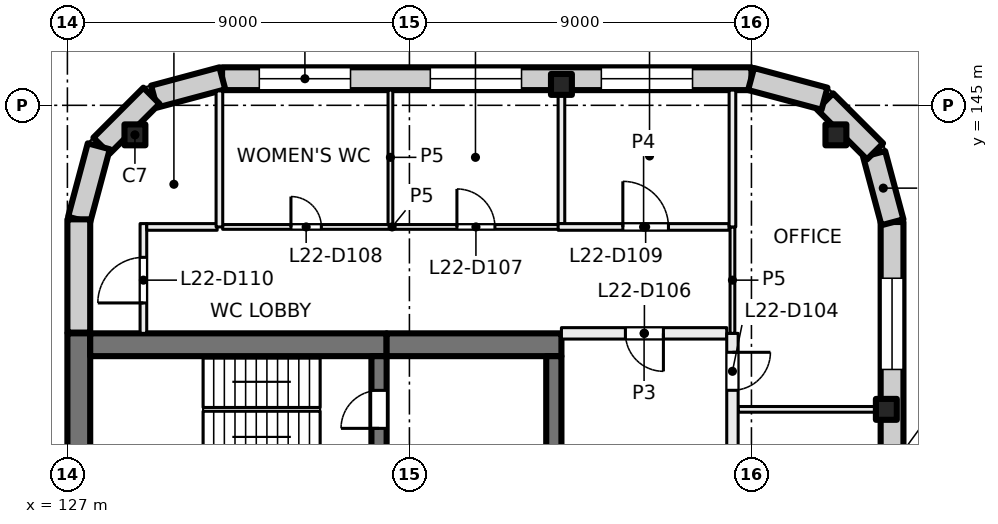
"""IFC4 building model, lengths in metres.
Left out: names, types, materials, properties, quantities, classifications, styles, units other than length and angle.
Written with IfcOpenShell. Run it as: python <this file> out.ifc"""

import sys

from ifc_helpers import new_model, si_unit, direction, frame, frame_2d, origin, origin_2d, place, context, subcontext, project, spatial, rectangle, extrude, element, fill, save


model = new_model("IFC4")
c1 = context("Model", 3, precision=1e-05, world=origin(), true_north=direction((0.0, 1.0)))
c2 = subcontext(c1, "Body", "Model", "MODEL_VIEW")
j1 = project(units=[si_unit("LENGTHUNIT", "METRE"), si_unit("PLANEANGLEUNIT", "RADIAN")], contexts=[c1])
p1 = place(None, origin())
s1 = spatial("IfcSite", under=j1, at=p1, CompositionType="ELEMENT")
p2 = place(p1, origin())
s2 = spatial("IfcBuilding", under=s1, at=p2, CompositionType="ELEMENT")
p3 = place(p2, frame((0.0, 0.0, 97.0)))
s3 = spatial("IfcBuildingStorey", under=s2, at=p3, CompositionType="ELEMENT", Elevation=97.0)
for number, where, z_axis, x_axis in (
    (1, (128.777, 144.223, 0.0), (0.0, 0.0, 1.0), (1.0, 0.0, 0.0)),
    (2, (148.55, 137.0, 0.0), (0.0, 0.0, 1.0), (1.0, 0.0, 0.0)),
    (3, (140.0, 145.55, 0.0), (0.0, 0.0, 1.0), (1.0, 0.0, 0.0)),
    (4, (147.223, 144.223, 0.0), (0.0, 0.0, 1.0), (1.0, 0.0, 0.0)),
):
    element("IfcColumn", number, at=place(p3, frame(where, z_axis=z_axis, x_axis=x_axis)), inside=s3, PredefinedType="COLUMN", context=c2, shape_type="SweptSolid", body=[
        extrude(rectangle(XDim=0.55, YDim=0.55, at=origin_2d()), origin(), (0.0, 0.0, 1.0), 4.0),
    ])
p4 = place(p3, frame((127.3, 135.2, 0.0), z_axis=(0.0, 0.0, 1.0), x_axis=(0.0, 1.0, 0.0)))
e5 = element("IfcWall", 5, at=p4, inside=s3, PredefinedType="SHEAR", context=c2, shape_type="SweptSolid", body=[
    extrude(rectangle(XDim=3.8, YDim=0.6, at=frame_2d((1.9, 0.0))), origin(), (0.0, 0.0, 1.0), 4.0),
])
p5 = place(p3, frame((127.6, 138.7, 0.0), z_axis=(0.0, 0.0, 1.0), x_axis=(1.0, 0.0, 0.0)))
e6 = element("IfcWall", 6, at=p5, inside=s3, PredefinedType="SHEAR", context=c2, shape_type="SweptSolid", body=[
    extrude(rectangle(XDim=7.8, YDim=0.6, at=frame_2d((3.9, 0.0))), origin(), (0.0, 0.0, 1.0), 4.0),
])
p6 = place(p3, frame((135.4, 138.7, 0.0), z_axis=(0.0, 0.0, 1.0), x_axis=(1.0, 0.0, 0.0)))
e7 = element("IfcWall", 7, at=p6, inside=s3, PredefinedType="SHEAR", context=c2, shape_type="SweptSolid", body=[
    extrude(rectangle(XDim=4.6, YDim=0.6, at=frame_2d((2.3, 0.0))), origin(), (0.0, 0.0, 1.0), 4.0),
])
p7 = place(p3, frame((135.2, 135.6, 0.0), z_axis=(0.0, 0.0, 1.0), x_axis=(0.0, 1.0, 0.0)))
e8 = element("IfcWall", 8, at=p7, inside=s3, PredefinedType="SHEAR", context=c2, shape_type="SweptSolid", body=[
    extrude(rectangle(XDim=2.8, YDim=0.4, at=frame_2d((1.4, 0.0))), origin(), (0.0, 0.0, 1.0), 4.0),
])
p8 = place(p7, frame((0.9, 0.0, 0.0)))
e9 = element("IfcOpeningElement", 9, at=p8, cuts=e8, PredefinedType="OPENING", context=c2, shape_type="SweptSolid", body=[
    extrude(rectangle(XDim=1.0, YDim=2.1, at=frame_2d((0.5, 1.05))), frame((0.0, 0.21, 0.0), z_axis=(0.0, -1.0, 0.0), x_axis=(1.0, 0.0, 0.0)), (0.0, 0.0, 1.0), 0.42),
])
p9 = place(p3, frame((139.8, 129.8, 0.0), z_axis=(0.0, 0.0, 1.0), x_axis=(0.0, 1.0, 0.0)))
e10 = element("IfcWall", 10, at=p9, inside=s3, PredefinedType="SHEAR", context=c2, shape_type="SweptSolid", body=[
    extrude(rectangle(XDim=8.6, YDim=0.4, at=frame_2d((4.3, 0.0))), origin(), (0.0, 0.0, 1.0), 4.0),
])
p10 = place(p3, frame((131.07, 145.7, 0.0), z_axis=(0.0, 0.0, 1.0), x_axis=(1.0, 0.0, 0.0)))
e11 = element("IfcWall", 11, at=p10, inside=s3, PredefinedType="SOLIDWALL", context=c2, shape_type="SweptSolid", body=[
    extrude(rectangle(XDim=13.93, YDim=0.6, at=frame_2d((6.965, 0.0))), origin(), (0.0, 0.0, 1.0), 3.625),
])
p11 = place(p10, frame((0.98, 0.0, 0.9)))
e12 = element("IfcOpeningElement", 12, at=p11, cuts=e11, PredefinedType="OPENING", context=c2, shape_type="SweptSolid", body=[
    extrude(rectangle(XDim=2.4, YDim=2.4, at=frame_2d((1.2, 1.2))), frame((0.0, 0.31, 0.0), z_axis=(0.0, -1.0, 0.0), x_axis=(1.0, 0.0, 0.0)), (0.0, 0.0, 1.0), 0.62),
])
p12 = place(p10, frame((5.48, 0.0, 0.9)))
e13 = element("IfcOpeningElement", 13, at=p12, cuts=e11, PredefinedType="OPENING", context=c2, shape_type="SweptSolid", body=[
    extrude(rectangle(XDim=2.4, YDim=2.4, at=frame_2d((1.2, 1.2))), frame((0.0, 0.31, 0.0), z_axis=(0.0, -1.0, 0.0), x_axis=(1.0, 0.0, 0.0)), (0.0, 0.0, 1.0), 0.62),
])
p13 = place(p10, frame((9.98, 0.0, 0.9)))
e14 = element("IfcOpeningElement", 14, at=p13, cuts=e11, PredefinedType="OPENING", context=c2, shape_type="SweptSolid", body=[
    extrude(rectangle(XDim=2.4, YDim=2.4, at=frame_2d((1.2, 1.2))), frame((0.0, 0.31, 0.0), z_axis=(0.0, -1.0, 0.0), x_axis=(1.0, 0.0, 0.0)), (0.0, 0.0, 1.0), 0.62),
])
for number, where, z_axis, x_axis in (
    (15, (129.281, 145.229, 0.0), (0.0, 0.0, 1.0), (0.966, 0.259, 0.0)),
    (16, (127.896, 143.936, 0.0), (0.0, 0.0, 1.0), (0.707, 0.707, 0.0)),
):
    element("IfcWall", number, at=place(p3, frame(where, z_axis=z_axis, x_axis=x_axis)), inside=s3, PredefinedType="SOLIDWALL", context=c2, shape_type="SweptSolid", body=[
        extrude(rectangle(XDim=1.861, YDim=0.6, at=frame_2d((0.93, 0.0))), origin(), (0.0, 0.0, 1.0), 3.625),
    ])
p14 = place(p3, frame((127.308, 141.99, 0.0), z_axis=(0.0, 0.0, 1.0), x_axis=(0.258839784042, 0.965920269068, 0.0)))
e17 = element("IfcWall", 17, at=p14, inside=s3, PredefinedType="SOLIDWALL", context=c2, shape_type="SweptSolid", body=[
    extrude(rectangle(XDim=2.0, YDim=0.6, at=frame_2d((1.0, 0.0))), origin(), (0.0, 0.0, 1.0), 3.625),
])
p15 = place(p3, frame((127.3, 139.02, 0.0), z_axis=(0.0, 0.0, 1.0), x_axis=(0.0, 1.0, 0.0)))
e18 = element("IfcWall", 18, at=p15, inside=s3, PredefinedType="SOLIDWALL", context=c2, shape_type="SweptSolid", body=[
    extrude(rectangle(XDim=2.98, YDim=0.6, at=frame_2d((1.49, 0.0))), origin(), (0.0, 0.0, 1.0), 3.625),
])
p16 = place(p3, frame((148.7, 141.93, 0.0), z_axis=(0.0, 0.0, 1.0), x_axis=(0.0, -1.0, 0.0)))
e19 = element("IfcWall", 19, at=p16, inside=s3, PredefinedType="SOLIDWALL", context=c2, shape_type="SweptSolid", body=[
    extrude(rectangle(XDim=27.93, YDim=0.6, at=frame_2d((13.965, 0.0))), origin(), (0.0, 0.0, 1.0), 3.625),
])
p17 = place(p16, frame((1.48, 0.0, 0.9)))
e20 = element("IfcOpeningElement", 20, at=p17, cuts=e19, PredefinedType="OPENING", context=c2, shape_type="SweptSolid", body=[
    extrude(rectangle(XDim=2.4, YDim=2.4, at=frame_2d((1.2, 1.2))), frame((0.0, 0.31, 0.0), z_axis=(0.0, -1.0, 0.0), x_axis=(1.0, 0.0, 0.0)), (0.0, 0.0, 1.0), 0.62),
])
p18 = place(p16, frame((5.98, 0.0, 0.9)))
e21 = element("IfcOpeningElement", 21, at=p18, cuts=e19, PredefinedType="OPENING", context=c2, shape_type="SweptSolid", body=[
    extrude(rectangle(XDim=2.4, YDim=2.4, at=frame_2d((1.2, 1.2))), frame((0.0, 0.31, 0.0), z_axis=(0.0, -1.0, 0.0), x_axis=(1.0, 0.0, 0.0)), (0.0, 0.0, 1.0), 0.62),
])
p19 = place(p16, frame((10.48, 0.0, 0.9)))
e22 = element("IfcOpeningElement", 22, at=p19, cuts=e19, PredefinedType="OPENING", context=c2, shape_type="SweptSolid", body=[
    extrude(rectangle(XDim=2.4, YDim=2.4, at=frame_2d((1.2, 1.2))), frame((0.0, 0.31, 0.0), z_axis=(0.0, -1.0, 0.0), x_axis=(1.0, 0.0, 0.0)), (0.0, 0.0, 1.0), 0.62),
])
p20 = place(p16, frame((14.98, 0.0, 0.9)))
e23 = element("IfcOpeningElement", 23, at=p20, cuts=e19, PredefinedType="OPENING", context=c2, shape_type="SweptSolid", body=[
    extrude(rectangle(XDim=2.4, YDim=2.4, at=frame_2d((1.2, 1.2))), frame((0.0, 0.31, 0.0), z_axis=(0.0, -1.0, 0.0), x_axis=(1.0, 0.0, 0.0)), (0.0, 0.0, 1.0), 0.62),
])
p21 = place(p16, frame((19.48, 0.0, 0.9)))
e24 = element("IfcOpeningElement", 24, at=p21, cuts=e19, PredefinedType="OPENING", context=c2, shape_type="SweptSolid", body=[
    extrude(rectangle(XDim=2.4, YDim=2.4, at=frame_2d((1.2, 1.2))), frame((0.0, 0.31, 0.0), z_axis=(0.0, -1.0, 0.0), x_axis=(1.0, 0.0, 0.0)), (0.0, 0.0, 1.0), 0.62),
])
p22 = place(p16, frame((23.98, 0.0, 0.9)))
e25 = element("IfcOpeningElement", 25, at=p22, cuts=e19, PredefinedType="OPENING", context=c2, shape_type="SweptSolid", body=[
    extrude(rectangle(XDim=2.4, YDim=2.4, at=frame_2d((1.2, 1.2))), frame((0.0, 0.31, 0.0), z_axis=(0.0, -1.0, 0.0), x_axis=(1.0, 0.0, 0.0)), (0.0, 0.0, 1.0), 0.62),
])
for number, where, z_axis, x_axis in (
    (26, (148.229, 143.719, 0.0), (0.0, 0.0, 1.0), (0.259, -0.966, 0.0)),
    (27, (146.936, 145.104, 0.0), (0.0, 0.0, 1.0), (0.707, -0.707, 0.0)),
):
    element("IfcWall", number, at=place(p3, frame(where, z_axis=z_axis, x_axis=x_axis)), inside=s3, PredefinedType="SOLIDWALL", context=c2, shape_type="SweptSolid", body=[
        extrude(rectangle(XDim=1.861, YDim=0.6, at=frame_2d((0.93, 0.0))), origin(), (0.0, 0.0, 1.0), 3.625),
    ])
p23 = place(p3, frame((144.99, 145.692, 0.0), z_axis=(0.0, 0.0, 1.0), x_axis=(0.965920269068, -0.258839784042, 0.0)))
e28 = element("IfcWall", 28, at=p23, inside=s3, PredefinedType="SOLIDWALL", context=c2, shape_type="SweptSolid", body=[
    extrude(rectangle(XDim=2.0, YDim=0.6, at=frame_2d((1.0, 0.0))), origin(), (0.0, 0.0, 1.0), 3.625),
])
p24 = place(p3, frame((129.0, 139.0, 0.0), z_axis=(0.0, 0.0, 1.0), x_axis=(0.0, 1.0, 0.0)))
e29 = element("IfcWall", 29, at=p24, inside=s3, PredefinedType="PARTITIONING", context=c2, shape_type="SweptSolid", body=[
    extrude(rectangle(XDim=2.888, YDim=0.175, at=frame_2d((1.444, 0.0))), origin(), (0.0, 0.0, 1.0), 3.625),
])
p25 = place(p24, frame((0.8, 0.0, 0.0)))
e30 = element("IfcOpeningElement", 30, at=p25, cuts=e29, PredefinedType="OPENING", context=c2, shape_type="SweptSolid", body=[
    extrude(rectangle(XDim=1.2, YDim=2.1, at=frame_2d((0.6, 1.05))), frame((0.0, 0.097, 0.0), z_axis=(0.0, -1.0, 0.0), x_axis=(1.0, 0.0, 0.0)), (0.0, 0.0, 1.0), 0.195),
])
p26 = place(p3, frame((129.088, 141.8, 0.0), z_axis=(0.0, 0.0, 1.0), x_axis=(1.0, 0.0, 0.0)))
e31 = element("IfcWall", 31, at=p26, inside=s3, PredefinedType="PARTITIONING", context=c2, shape_type="SweptSolid", body=[
    extrude(rectangle(XDim=1.853, YDim=0.175, at=frame_2d((0.927, 0.0))), origin(), (0.0, 0.0, 1.0), 3.625),
])
p27 = place(p3, frame((131.085, 141.8, 0.0), z_axis=(0.0, 0.0, 1.0), x_axis=(1.0, 0.0, 0.0)))
e32 = element("IfcWall", 32, at=p27, inside=s3, PredefinedType="PARTITIONING", context=c2, shape_type="SweptSolid", body=[
    extrude(rectangle(XDim=8.918, YDim=0.125, at=frame_2d((4.459, 0.0))), origin(), (0.0, 0.0, 1.0), 3.625),
])
p28 = place(p27, frame((6.165, 0.0, 0.0)))
e33 = element("IfcOpeningElement", 33, at=p28, cuts=e32, PredefinedType="OPENING", context=c2, shape_type="SweptSolid", body=[
    extrude(rectangle(XDim=1.0, YDim=2.1, at=frame_2d((0.5, 1.05))), frame((0.0, 0.073, 0.0), z_axis=(0.0, -1.0, 0.0), x_axis=(1.0, 0.0, 0.0)), (0.0, 0.0, 1.0), 0.145),
])
p29 = place(p27, frame((1.798, 0.0, 0.0)))
e34 = element("IfcOpeningElement", 34, at=p29, cuts=e32, PredefinedType="OPENING", context=c2, shape_type="SweptSolid", body=[
    extrude(rectangle(XDim=0.8, YDim=2.1, at=frame_2d((0.4, 1.05))), frame((0.0, 0.073, 0.0), z_axis=(0.0, -1.0, 0.0), x_axis=(1.0, 0.0, 0.0)), (0.0, 0.0, 1.0), 0.145),
])
p30 = place(p3, frame((131.0, 145.379, 0.0), z_axis=(0.0, 0.0, 1.0), x_axis=(0.0, -1.0, 0.0)))
e35 = element("IfcWall", 35, at=p30, inside=s3, PredefinedType="PARTITIONING", context=c2, shape_type="SweptSolid", body=[
    extrude(rectangle(XDim=3.579, YDim=0.175, at=frame_2d((1.79, 0.0))), origin(), (0.0, 0.0, 1.0), 3.625),
])
p31 = place(p3, frame((135.5, 141.862, 0.0), z_axis=(0.0, 0.0, 1.0), x_axis=(0.0, 1.0, 0.0)))
e36 = element("IfcWall", 36, at=p31, inside=s3, PredefinedType="PARTITIONING", context=c2, shape_type="SweptSolid", body=[
    extrude(rectangle(XDim=3.538, YDim=0.125, at=frame_2d((1.769, 0.0))), origin(), (0.0, 0.0, 1.0), 3.625),
])
p32 = place(p3, frame((144.35, 139.0, 0.0), z_axis=(0.0, 0.0, 1.0), x_axis=(-1.0, 0.0, 0.0)))
e37 = element("IfcWall", 37, at=p32, inside=s3, PredefinedType="PARTITIONING", context=c2, shape_type="SweptSolid", body=[
    extrude(rectangle(XDim=4.35, YDim=0.3, at=frame_2d((2.175, 0.0))), origin(), (0.0, 0.0, 1.0), 3.625),
])
p33 = place(p32, frame((1.667, 0.0, 0.0)))
e38 = element("IfcOpeningElement", 38, at=p33, cuts=e37, PredefinedType="OPENING", context=c2, shape_type="SweptSolid", body=[
    extrude(rectangle(XDim=1.0, YDim=2.1, at=frame_2d((0.5, 1.05))), frame((0.0, 0.16, 0.0), z_axis=(0.0, -1.0, 0.0), x_axis=(1.0, 0.0, 0.0)), (0.0, 0.0, 1.0), 0.32),
])
p34 = place(p3, frame((140.0, 141.888, 0.0), z_axis=(0.0, 0.0, 1.0), x_axis=(0.0, 1.0, 0.0)))
e39 = element("IfcWall", 39, at=p34, inside=s3, PredefinedType="PARTITIONING", context=c2, shape_type="SweptSolid", body=[
    extrude(rectangle(XDim=3.512, YDim=0.175, at=frame_2d((1.756, 0.0))), origin(), (0.0, 0.0, 1.0), 3.625),
])
p35 = place(p3, frame((139.912, 141.8, 0.0), z_axis=(0.0, 0.0, 1.0), x_axis=(1.0, 0.0, 0.0)))
e40 = element("IfcWall", 40, at=p35, inside=s3, PredefinedType="PARTITIONING", context=c2, shape_type="SweptSolid", body=[
    extrude(rectangle(XDim=4.5, YDim=0.175, at=frame_2d((2.25, 0.0))), origin(), (0.0, 0.0, 1.0), 3.625),
])
p36 = place(p35, frame((1.704, 0.0, 0.0)))
e41 = element("IfcOpeningElement", 41, at=p36, cuts=e40, PredefinedType="OPENING", context=c2, shape_type="SweptSolid", body=[
    extrude(rectangle(XDim=1.2, YDim=2.1, at=frame_2d((0.6, 1.05))), frame((0.0, 0.097, 0.0), z_axis=(0.0, -1.0, 0.0), x_axis=(1.0, 0.0, 0.0)), (0.0, 0.0, 1.0), 0.195),
])
p37 = place(p3, frame((144.65, 137.0, 0.0), z_axis=(0.0, 0.0, 1.0), x_axis=(1.0, 0.0, 0.0)))
e42 = element("IfcWall", 42, at=p37, inside=s3, PredefinedType="PARTITIONING", context=c2, shape_type="SweptSolid", body=[
    extrude(rectangle(XDim=3.75, YDim=0.15, at=frame_2d((1.875, 0.0))), origin(), (0.0, 0.0, 1.0), 3.625),
])
p38 = place(p3, frame((144.5, 139.0, 0.0), z_axis=(0.0, 0.0, 1.0), x_axis=(0.0, -1.0, 0.0)))
e43 = element("IfcWall", 43, at=p38, inside=s3, PredefinedType="PARTITIONING", context=c2, shape_type="SweptSolid", body=[
    extrude(rectangle(XDim=22.0, YDim=0.3, at=frame_2d((11.0, 0.0))), origin(), (0.0, 0.0, 1.0), 3.625),
])
p39 = place(p38, frame((20.501, 0.0, 0.0)))
e44 = element("IfcOpeningElement", 44, at=p39, cuts=e43, PredefinedType="OPENING", context=c2, shape_type="SweptSolid", body=[
    extrude(rectangle(XDim=1.0, YDim=2.1, at=frame_2d((0.5, 1.05))), frame((0.0, 0.16, 0.0), z_axis=(0.0, -1.0, 0.0), x_axis=(1.0, 0.0, 0.0)), (0.0, 0.0, 1.0), 0.32),
])
p40 = place(p38, frame((15.0, 0.0, 0.0)))
e45 = element("IfcOpeningElement", 45, at=p40, cuts=e43, PredefinedType="OPENING", context=c2, shape_type="SweptSolid", body=[
    extrude(rectangle(XDim=1.0, YDim=2.1, at=frame_2d((0.5, 1.05))), frame((0.0, 0.16, 0.0), z_axis=(0.0, -1.0, 0.0), x_axis=(1.0, 0.0, 0.0)), (0.0, 0.0, 1.0), 0.32),
])
p41 = place(p38, frame((6.0, 0.0, 0.0)))
e46 = element("IfcOpeningElement", 46, at=p41, cuts=e43, PredefinedType="OPENING", context=c2, shape_type="SweptSolid", body=[
    extrude(rectangle(XDim=1.0, YDim=2.1, at=frame_2d((0.5, 1.05))), frame((0.0, 0.16, 0.0), z_axis=(0.0, -1.0, 0.0), x_axis=(1.0, 0.0, 0.0)), (0.0, 0.0, 1.0), 0.32),
])
p42 = place(p38, frame((0.499, 0.0, 0.0)))
e47 = element("IfcOpeningElement", 47, at=p42, cuts=e43, PredefinedType="OPENING", context=c2, shape_type="SweptSolid", body=[
    extrude(rectangle(XDim=1.0, YDim=2.1, at=frame_2d((0.5, 1.05))), frame((0.0, 0.16, 0.0), z_axis=(0.0, -1.0, 0.0), x_axis=(1.0, 0.0, 0.0)), (0.0, 0.0, 1.0), 0.32),
])
p43 = place(p3, frame((144.5, 141.8, 0.0), z_axis=(0.0, 0.0, 1.0), x_axis=(0.0, -1.0, 0.0)))
e48 = element("IfcWall", 48, at=p43, inside=s3, PredefinedType="PARTITIONING", context=c2, shape_type="SweptSolid", body=[
    extrude(rectangle(XDim=2.8, YDim=0.125, at=frame_2d((1.4, 0.0))), origin(), (0.0, 0.0, 1.0), 3.625),
])
p44 = place(p3, frame((144.5, 141.8, 0.0), z_axis=(0.0, 0.0, 1.0), x_axis=(0.0, 1.0, 0.0)))
e49 = element("IfcWall", 49, at=p44, inside=s3, PredefinedType="PARTITIONING", context=c2, shape_type="SweptSolid", body=[
    extrude(rectangle(XDim=3.6, YDim=0.175, at=frame_2d((1.8, 0.0))), origin(), (0.0, 0.0, 1.0), 3.625),
])
p45 = place(p11, origin())
e50 = element("IfcWindow", 50, at=p45, inside=s3, PartitioningType="SINGLE_PANEL", PredefinedType="WINDOW", context=c2, shape_type="SweptSolid", body=[
    extrude(rectangle(XDim=2.4, YDim=2.4, at=frame_2d((1.2, 1.2))), frame((0.0, 0.03, 0.0), z_axis=(0.0, -1.0, 0.0), x_axis=(1.0, 0.0, 0.0)), (0.0, 0.0, 1.0), 0.06),
])
fill(e12, e50)
p46 = place(p12, origin())
e51 = element("IfcWindow", 51, at=p46, inside=s3, PartitioningType="SINGLE_PANEL", PredefinedType="WINDOW", context=c2, shape_type="SweptSolid", body=[
    extrude(rectangle(XDim=2.4, YDim=2.4, at=frame_2d((1.2, 1.2))), frame((0.0, 0.03, 0.0), z_axis=(0.0, -1.0, 0.0), x_axis=(1.0, 0.0, 0.0)), (0.0, 0.0, 1.0), 0.06),
])
fill(e13, e51)
p47 = place(p13, origin())
e52 = element("IfcWindow", 52, at=p47, inside=s3, PartitioningType="SINGLE_PANEL", PredefinedType="WINDOW", context=c2, shape_type="SweptSolid", body=[
    extrude(rectangle(XDim=2.4, YDim=2.4, at=frame_2d((1.2, 1.2))), frame((0.0, 0.03, 0.0), z_axis=(0.0, -1.0, 0.0), x_axis=(1.0, 0.0, 0.0)), (0.0, 0.0, 1.0), 0.06),
])
fill(e14, e52)
p48 = place(p17, origin())
e53 = element("IfcWindow", 53, at=p48, inside=s3, PartitioningType="SINGLE_PANEL", PredefinedType="WINDOW", context=c2, shape_type="SweptSolid", body=[
    extrude(rectangle(XDim=2.4, YDim=2.4, at=frame_2d((1.2, 1.2))), frame((0.0, 0.03, 0.0), z_axis=(0.0, -1.0, 0.0), x_axis=(1.0, 0.0, 0.0)), (0.0, 0.0, 1.0), 0.06),
])
fill(e20, e53)
p49 = place(p8, origin())
e54 = element("IfcDoor", 54, at=p49, inside=s3, OperationType="SINGLE_SWING_LEFT", PredefinedType="DOOR", context=c2, shape_type="SweptSolid", body=[
    extrude(rectangle(XDim=1.0, YDim=2.1, at=frame_2d((0.5, 1.05))), frame((0.0, 0.025, 0.0), z_axis=(0.0, -1.0, 0.0), x_axis=(1.0, 0.0, 0.0)), (0.0, 0.0, 1.0), 0.05),
])
fill(e9, e54)
p50 = place(p42, origin())
e55 = element("IfcDoor", 55, at=p50, inside=s3, OperationType="SINGLE_SWING_LEFT", PredefinedType="DOOR", context=c2, shape_type="SweptSolid", body=[
    extrude(rectangle(XDim=1.0, YDim=2.1, at=frame_2d((0.5, 1.05))), frame((0.0, 0.025, 0.0), z_axis=(0.0, -1.0, 0.0), x_axis=(1.0, 0.0, 0.0)), (0.0, 0.0, 1.0), 0.05),
])
fill(e47, e55)
p51 = place(p33, origin())
e56 = element("IfcDoor", 56, at=p51, inside=s3, OperationType="SINGLE_SWING_LEFT", PredefinedType="DOOR", context=c2, shape_type="SweptSolid", body=[
    extrude(rectangle(XDim=1.0, YDim=2.1, at=frame_2d((0.5, 1.05))), frame((0.0, 0.025, 0.0), z_axis=(0.0, -1.0, 0.0), x_axis=(1.0, 0.0, 0.0)), (0.0, 0.0, 1.0), 0.05),
])
fill(e38, e56)
p52 = place(p28, origin())
e57 = element("IfcDoor", 57, at=p52, inside=s3, OperationType="SINGLE_SWING_RIGHT", PredefinedType="DOOR", context=c2, shape_type="SweptSolid", body=[
    extrude(rectangle(XDim=1.0, YDim=2.1, at=frame_2d((0.5, 1.05))), frame((0.0, 0.025, 0.0), z_axis=(0.0, -1.0, 0.0), x_axis=(1.0, 0.0, 0.0)), (0.0, 0.0, 1.0), 0.05),
])
fill(e33, e57)
p53 = place(p29, origin())
e58 = element("IfcDoor", 58, at=p53, inside=s3, OperationType="SINGLE_SWING_LEFT", PredefinedType="DOOR", context=c2, shape_type="SweptSolid", body=[
    extrude(rectangle(XDim=0.8, YDim=2.1, at=frame_2d((0.4, 1.05))), frame((0.0, 0.025, 0.0), z_axis=(0.0, -1.0, 0.0), x_axis=(1.0, 0.0, 0.0)), (0.0, 0.0, 1.0), 0.05),
])
fill(e34, e58)
p54 = place(p36, origin())
e59 = element("IfcDoor", 59, at=p54, inside=s3, OperationType="DOUBLE_DOOR_SINGLE_SWING", PredefinedType="DOOR", context=c2, shape_type="SweptSolid", body=[
    extrude(rectangle(XDim=1.2, YDim=2.1, at=frame_2d((0.6, 1.05))), frame((0.0, 0.025, 0.0), z_axis=(0.0, -1.0, 0.0), x_axis=(1.0, 0.0, 0.0)), (0.0, 0.0, 1.0), 0.05),
])
fill(e41, e59)
p55 = place(p25, origin())
e60 = element("IfcDoor", 60, at=p55, inside=s3, OperationType="DOUBLE_DOOR_SINGLE_SWING", PredefinedType="DOOR", context=c2, shape_type="SweptSolid", body=[
    extrude(rectangle(XDim=1.2, YDim=2.1, at=frame_2d((0.6, 1.05))), frame((0.0, 0.025, 0.0), z_axis=(0.0, -1.0, 0.0), x_axis=(1.0, 0.0, 0.0)), (0.0, 0.0, 1.0), 0.05),
])
fill(e30, e60)
save(model, sys.argv[1])
